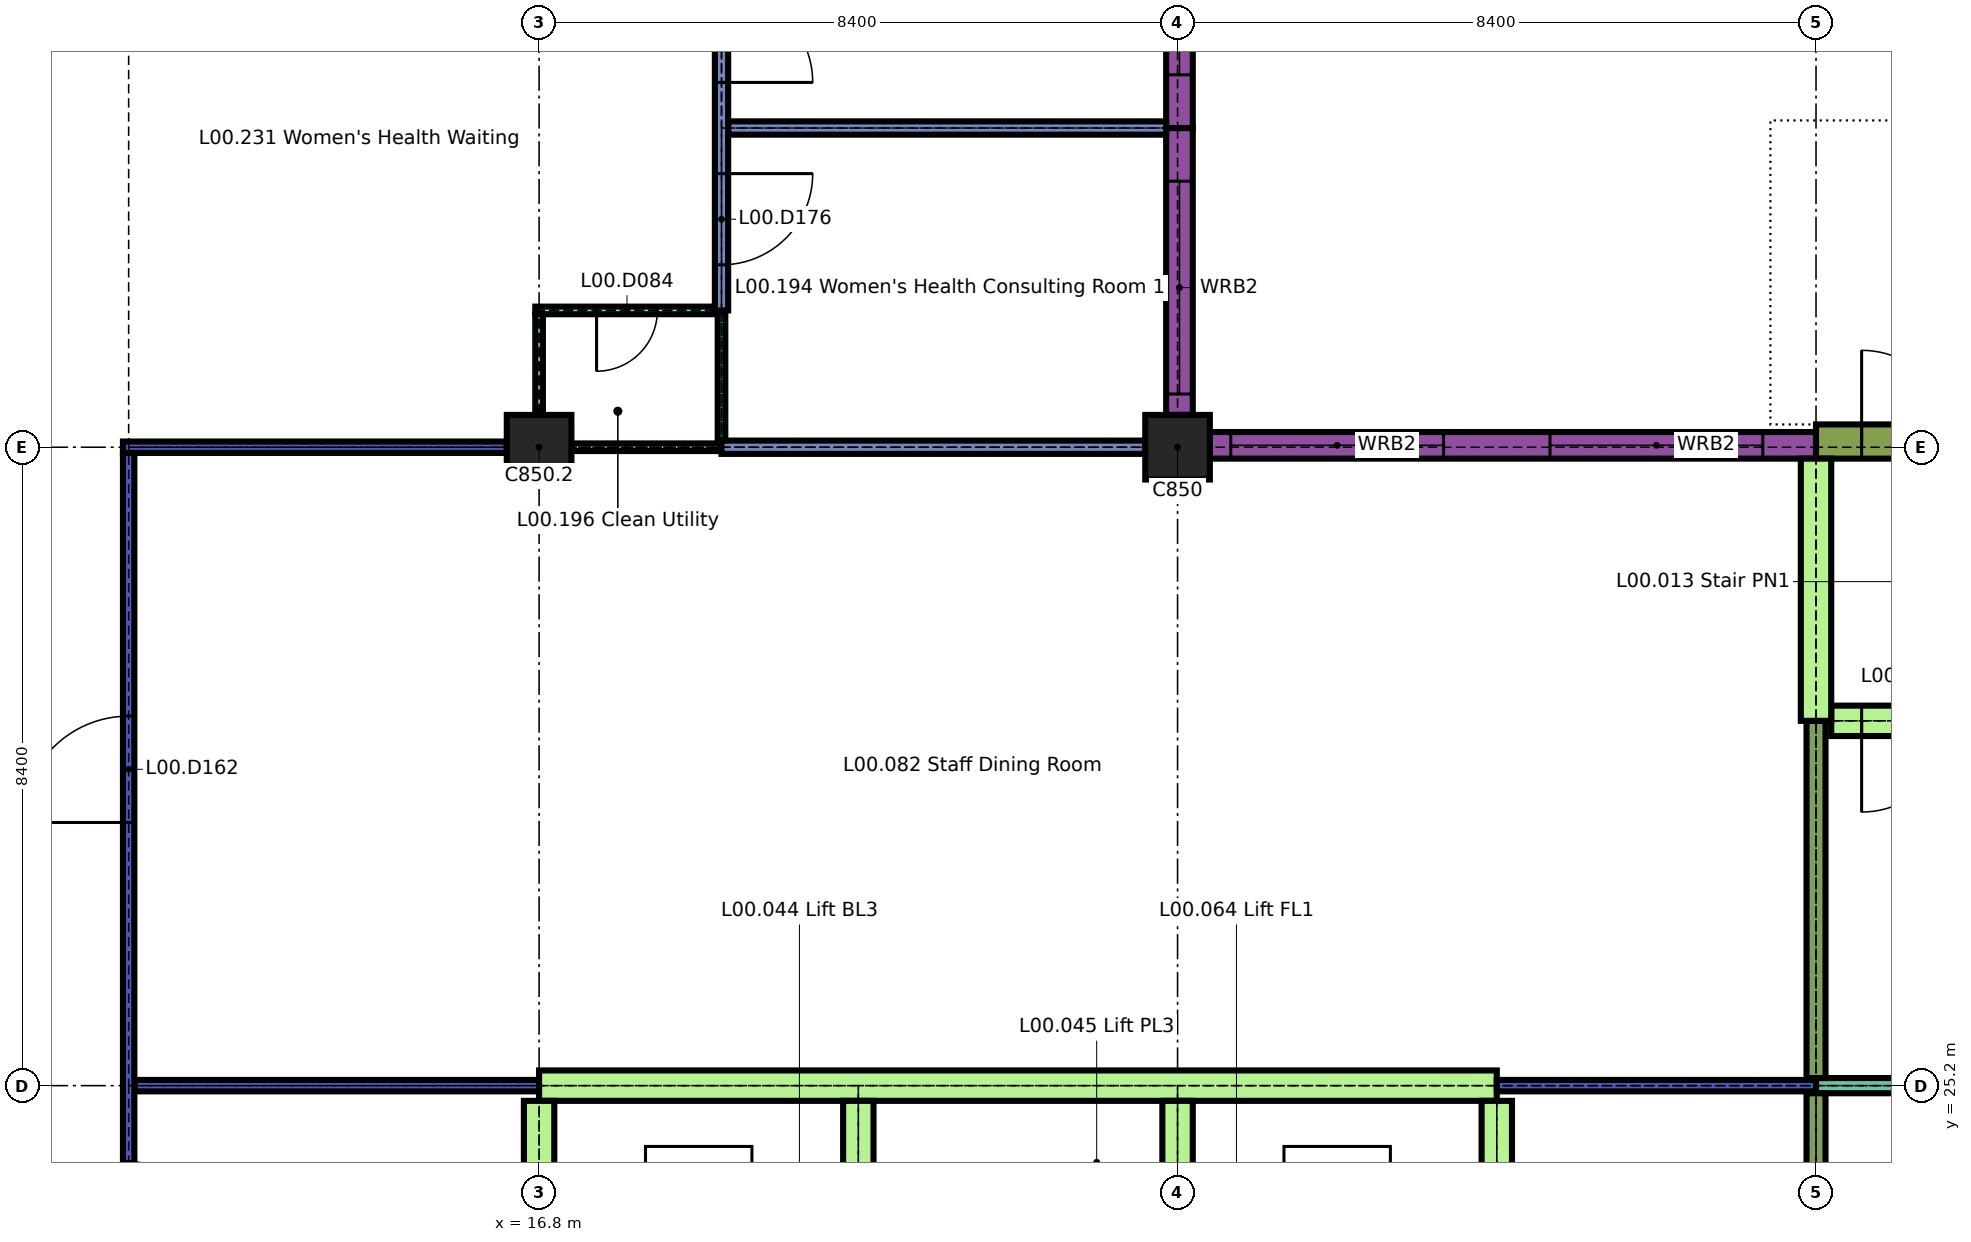
"""IFC4 building model, lengths in metres.
Left out: names, types, materials, properties, quantities, classifications, styles, units other than length and angle.
Written with IfcOpenShell. Run it as: python <this file> out.ifc"""

import sys

from ifc_helpers import new_model, si_unit, direction, frame, frame_2d, origin, origin_2d, place, context, subcontext, project, spatial, rectangle, extrude, element, fill, save


model = new_model("IFC4")
c1 = context("Model", 3, precision=1e-05, world=origin(), true_north=direction((0.0, 1.0)))
c2 = subcontext(c1, "Body", "Model", "MODEL_VIEW")
j1 = project(units=[si_unit("LENGTHUNIT", "METRE"), si_unit("PLANEANGLEUNIT", "RADIAN")], contexts=[c1])
p1 = place(None, origin())
s1 = spatial("IfcSite", under=j1, at=p1, CompositionType="ELEMENT")
p2 = place(p1, origin())
s2 = spatial("IfcBuilding", under=s1, at=p2, CompositionType="ELEMENT")
p3 = place(p2, origin())
s3 = spatial("IfcBuildingStorey", under=s2, at=p3, CompositionType="ELEMENT", Elevation=0.0)
for number, where, z_axis, x_axis in (
    (1, (16.8, 33.6, 0.0), (0.0, 0.0, 1.0), (1.0, 0.0, 0.0)),
    (2, (25.2, 33.6, 0.0), (0.0, 0.0, 1.0), (1.0, 0.0, 0.0)),
):
    element("IfcColumn", number, at=place(p3, frame(where, z_axis=z_axis, x_axis=x_axis)), inside=s3, PredefinedType="COLUMN", context=c2, shape_type="SweptSolid", body=[
        extrude(rectangle(XDim=0.85, YDim=0.85, at=origin_2d()), origin(), (0.0, 0.0, 1.0), 4.14),
    ])
p4 = place(p3, frame((25.625, 33.625, 0.0), z_axis=(0.0, 0.0, 1.0), x_axis=(1.0, 0.0, 0.0)))
e3 = element("IfcWall", 3, at=p4, inside=s3, PredefinedType="SOLIDWALL", context=c2, shape_type="SweptSolid", body=[
    extrude(rectangle(XDim=7.975, YDim=0.35, at=frame_2d((3.988, 0.0))), origin(), (0.0, 0.0, 1.0), 3.84),
])
p5 = place(p4, frame((0.275, 0.0, 1.0)))
e4 = element("IfcOpeningElement", 4, at=p5, cuts=e3, PredefinedType="OPENING", context=c2, shape_type="SweptSolid", body=[
    extrude(rectangle(XDim=2.8, YDim=1.5, at=frame_2d((1.4, 0.75))), frame((0.0, 0.185, 0.0), z_axis=(0.0, -1.0, 0.0), x_axis=(1.0, 0.0, 0.0)), (0.0, 0.0, 1.0), 0.37),
])
p6 = place(p4, frame((4.475, 0.0, 1.0)))
e5 = element("IfcOpeningElement", 5, at=p6, cuts=e3, PredefinedType="OPENING", context=c2, shape_type="SweptSolid", body=[
    extrude(rectangle(XDim=2.8, YDim=1.5, at=frame_2d((1.4, 0.75))), frame((0.0, 0.185, 0.0), z_axis=(0.0, -1.0, 0.0), x_axis=(1.0, 0.0, 0.0)), (0.0, 0.0, 1.0), 0.37),
])
p7 = place(p3, frame((33.6, 33.675, 0.0), z_axis=(0.0, 0.0, 1.0), x_axis=(1.0, 0.0, 0.0)))
e6 = element("IfcWall", 6, at=p7, inside=s3, PredefinedType="SOLIDWALL", context=c2, shape_type="SweptSolid", body=[
    extrude(rectangle(XDim=3.7, YDim=0.45, at=frame_2d((1.85, 0.0))), origin(), (0.0, 0.0, 1.0), 4.14),
])
p8 = place(p7, frame((0.6, 0.0, 0.0)))
e7 = element("IfcOpeningElement", 7, at=p8, cuts=e6, PredefinedType="OPENING", context=c2, shape_type="SweptSolid", body=[
    extrude(rectangle(XDim=1.2, YDim=2.1, at=frame_2d((0.6, 1.05))), frame((0.0, 0.235, 0.0), z_axis=(0.0, -1.0, 0.0), x_axis=(1.0, 0.0, 0.0)), (0.0, 0.0, 1.0), 0.47),
])
p9 = place(p3, frame((25.225, 34.025, 0.0), z_axis=(0.0, 0.0, 1.0), x_axis=(0.0, 1.0, 0.0)))
e8 = element("IfcWall", 8, at=p9, inside=s3, PredefinedType="SOLIDWALL", context=c2, shape_type="SweptSolid", body=[
    extrude(rectangle(XDim=3.775, YDim=0.35, at=frame_2d((1.888, 0.0))), origin(), (0.0, 0.0, 1.0), 3.84),
])
p10 = place(p9, frame((0.275, 0.0, 1.0)))
e9 = element("IfcOpeningElement", 9, at=p10, cuts=e8, PredefinedType="OPENING", context=c2, shape_type="SweptSolid", body=[
    extrude(rectangle(XDim=2.8, YDim=1.5, at=frame_2d((1.4, 0.75))), frame((0.0, 0.185, 0.0), z_axis=(0.0, -1.0, 0.0), x_axis=(1.0, 0.0, 0.0)), (0.0, 0.0, 1.0), 0.37),
])
p11 = place(p3, frame((25.225, 37.8, 0.0), z_axis=(0.0, 0.0, 1.0), x_axis=(0.0, 1.0, 0.0)))
e10 = element("IfcWall", 10, at=p11, inside=s3, PredefinedType="SOLIDWALL", context=c2, shape_type="SweptSolid", body=[
    extrude(rectangle(XDim=4.2, YDim=0.35, at=frame_2d((2.1, 0.0))), origin(), (0.0, 0.0, 1.0), 3.84),
])
p12 = place(p11, frame((0.7, 0.0, 1.0)))
e11 = element("IfcOpeningElement", 11, at=p12, cuts=e10, PredefinedType="OPENING", context=c2, shape_type="SweptSolid", body=[
    extrude(rectangle(XDim=2.8, YDim=1.5, at=frame_2d((1.4, 0.75))), frame((0.0, 0.185, 0.0), z_axis=(0.0, -1.0, 0.0), x_axis=(1.0, 0.0, 0.0)), (0.0, 0.0, 1.0), 0.37),
])
p13 = place(p3, frame((11.475, 25.2, 0.0), z_axis=(0.0, 0.0, 1.0), x_axis=(1.0, 0.0, 0.0)))
e12 = element("IfcWall", 12, at=p13, inside=s3, PredefinedType="PARTITIONING", context=c2, shape_type="SweptSolid", body=[
    extrude(rectangle(XDim=5.325, YDim=0.15, at=frame_2d((2.663, 0.0))), origin(), (0.0, 0.0, 1.0), 4.14),
])
p14 = place(p3, frame((16.8, 25.2, 0.0), z_axis=(0.0, 0.0, 1.0), x_axis=(1.0, 0.0, 0.0)))
e13 = element("IfcWall", 13, at=p14, inside=s3, PredefinedType="SHEAR", context=c2, shape_type="SweptSolid", body=[
    extrude(rectangle(XDim=12.6, YDim=0.4, at=frame_2d((6.3, 0.0))), origin(), (0.0, 0.0, 1.0), 4.14),
])
p15 = place(p3, frame((29.4, 25.2, 0.0), z_axis=(0.0, 0.0, 1.0), x_axis=(1.0, 0.0, 0.0)))
e14 = element("IfcWall", 14, at=p15, inside=s3, PredefinedType="PARTITIONING", context=c2, shape_type="SweptSolid", body=[
    extrude(rectangle(XDim=4.2, YDim=0.15, at=frame_2d((2.1, 0.0))), origin(), (0.0, 0.0, 1.0), 4.14),
])
p16 = place(p3, frame((33.6, 25.2, 0.0), z_axis=(0.0, 0.0, 1.0), x_axis=(1.0, 0.0, 0.0)))
e15 = element("IfcWall", 15, at=p16, inside=s3, PredefinedType="PARTITIONING", context=c2, shape_type="SweptSolid", body=[
    extrude(rectangle(XDim=8.4, YDim=0.2, at=frame_2d((4.2, 0.0))), origin(), (0.0, 0.0, 1.0), 4.14),
])
p17 = place(p16, frame((3.5, 0.0, 0.0)))
e16 = element("IfcOpeningElement", 16, at=p17, cuts=e15, PredefinedType="OPENING", context=c2, shape_type="SweptSolid", body=[
    extrude(rectangle(XDim=1.4, YDim=2.1, at=frame_2d((0.7, 1.05))), frame((0.0, 0.11, 0.0), z_axis=(0.0, -1.0, 0.0), x_axis=(1.0, 0.0, 0.0)), (0.0, 0.0, 1.0), 0.22),
])
p18 = place(p3, frame((33.8, 30.0, 0.0), z_axis=(0.0, 0.0, 1.0), x_axis=(1.0, 0.0, 0.0)))
e17 = element("IfcWall", 17, at=p18, inside=s3, PredefinedType="SHEAR", context=c2, shape_type="SweptSolid", body=[
    extrude(rectangle(XDim=8.0, YDim=0.4, at=frame_2d((4.0, 0.0))), origin(), (0.0, 0.0, 1.0), 4.14),
])
p19 = place(p18, frame((0.4, 0.0, 0.0)))
e18 = element("IfcOpeningElement", 18, at=p19, cuts=e17, PredefinedType="OPENING", context=c2, shape_type="SweptSolid", body=[
    extrude(rectangle(XDim=1.2, YDim=2.1, at=frame_2d((0.6, 1.05))), frame((0.0, 0.21, 0.0), z_axis=(0.0, -1.0, 0.0), x_axis=(1.0, 0.0, 0.0)), (0.0, 0.0, 1.0), 0.42),
])
p20 = place(p3, frame((11.325, 33.6, 0.0), z_axis=(0.0, 0.0, 1.0), x_axis=(1.0, 0.0, 0.0)))
e19 = element("IfcWall", 19, at=p20, inside=s3, PredefinedType="PARTITIONING", context=c2, shape_type="SweptSolid", body=[
    extrude(rectangle(XDim=5.05, YDim=0.15, at=frame_2d((2.525, 0.0))), origin(), (0.0, 0.0, 1.0), 4.14),
])
p21 = place(p3, frame((17.225, 33.6, 0.0), z_axis=(0.0, 0.0, 1.0), x_axis=(1.0, 0.0, 0.0)))
e20 = element("IfcWall", 20, at=p21, inside=s3, PredefinedType="PARTITIONING", context=c2, shape_type="SweptSolid", body=[
    extrude(rectangle(XDim=1.975, YDim=0.1, at=frame_2d((0.987, 0.0))), origin(), (0.0, 0.0, 1.0), 4.14),
])
p22 = place(p3, frame((19.2, 33.6, 0.0), z_axis=(0.0, 0.0, 1.0), x_axis=(1.0, 0.0, 0.0)))
e21 = element("IfcWall", 21, at=p22, inside=s3, PredefinedType="PARTITIONING", context=c2, shape_type="SweptSolid", body=[
    extrude(rectangle(XDim=5.575, YDim=0.175, at=frame_2d((2.788, 0.0))), origin(), (0.0, 0.0, 1.0), 4.14),
])
p23 = place(p3, frame((16.75, 35.4, 0.0), z_axis=(0.0, 0.0, 1.0), x_axis=(1.0, 0.0, 0.0)))
e22 = element("IfcWall", 22, at=p23, inside=s3, PredefinedType="PARTITIONING", context=c2, shape_type="SweptSolid", body=[
    extrude(rectangle(XDim=2.363, YDim=0.1, at=frame_2d((1.181, 0.0))), origin(), (0.0, 0.0, 1.0), 4.14),
])
p24 = place(p23, frame((0.806, 0.0, 0.0)))
e23 = element("IfcOpeningElement", 23, at=p24, cuts=e22, PredefinedType="OPENING", context=c2, shape_type="SweptSolid", body=[
    extrude(rectangle(XDim=0.8, YDim=2.1, at=frame_2d((0.4, 1.05))), frame((0.0, 0.06, 0.0), z_axis=(0.0, -1.0, 0.0), x_axis=(1.0, 0.0, 0.0)), (0.0, 0.0, 1.0), 0.12),
])
p25 = place(p3, frame((19.288, 37.8, 0.0), z_axis=(0.0, 0.0, 1.0), x_axis=(1.0, 0.0, 0.0)))
e24 = element("IfcWall", 24, at=p25, inside=s3, PredefinedType="PARTITIONING", context=c2, shape_type="SweptSolid", body=[
    extrude(rectangle(XDim=5.762, YDim=0.175, at=frame_2d((2.881, 0.0))), origin(), (0.0, 0.0, 1.0), 4.14),
])
p26 = place(p3, frame((11.4, 16.875, 0.0), z_axis=(0.0, 0.0, 1.0), x_axis=(0.0, 1.0, 0.0)))
e25 = element("IfcWall", 25, at=p26, inside=s3, PredefinedType="PARTITIONING", context=c2, shape_type="SweptSolid", body=[
    extrude(rectangle(XDim=16.65, YDim=0.15, at=frame_2d((8.325, 0.0))), origin(), (0.0, 0.0, 1.0), 4.14),
])
p27 = place(p26, frame((2.062, 0.0, 0.0)))
e26 = element("IfcOpeningElement", 26, at=p27, cuts=e25, PredefinedType="OPENING", context=c2, shape_type="SweptSolid", body=[
    extrude(rectangle(XDim=1.2, YDim=2.1, at=frame_2d((0.6, 1.05))), frame((0.0, 0.085, 0.0), z_axis=(0.0, -1.0, 0.0), x_axis=(1.0, 0.0, 0.0)), (0.0, 0.0, 1.0), 0.17),
])
p28 = place(p26, frame((6.325, 0.0, 0.0)))
e27 = element("IfcOpeningElement", 27, at=p28, cuts=e25, PredefinedType="OPENING", context=c2, shape_type="SweptSolid", body=[
    extrude(rectangle(XDim=1.0, YDim=2.1, at=frame_2d((0.5, 1.05))), frame((0.0, 0.085, 0.0), z_axis=(0.0, -1.0, 0.0), x_axis=(1.0, 0.0, 0.0)), (0.0, 0.0, 1.0), 0.17),
])
p29 = place(p26, frame((11.788, 0.0, 0.0)))
e28 = element("IfcOpeningElement", 28, at=p29, cuts=e25, PredefinedType="OPENING", context=c2, shape_type="SweptSolid", body=[
    extrude(rectangle(XDim=1.4, YDim=2.1, at=frame_2d((0.7, 1.05))), frame((0.0, 0.085, 0.0), z_axis=(0.0, -1.0, 0.0), x_axis=(1.0, 0.0, 0.0)), (0.0, 0.0, 1.0), 0.17),
])
p30 = place(p3, frame((16.8, 21.6, 0.0), z_axis=(0.0, 0.0, 1.0), x_axis=(0.0, 1.0, 0.0)))
e29 = element("IfcWall", 29, at=p30, inside=s3, PredefinedType="SHEAR", context=c2, shape_type="SweptSolid", body=[
    extrude(rectangle(XDim=3.4, YDim=0.4, at=frame_2d((1.7, 0.0))), origin(), (0.0, 0.0, 1.0), 4.14),
])
p31 = place(p3, frame((16.8, 34.025, 0.0), z_axis=(0.0, 0.0, 1.0), x_axis=(0.0, 1.0, 0.0)))
e30 = element("IfcWall", 30, at=p31, inside=s3, PredefinedType="PARTITIONING", context=c2, shape_type="SweptSolid", body=[
    extrude(rectangle(XDim=1.325, YDim=0.1, at=frame_2d((0.663, 0.0))), origin(), (0.0, 0.0, 1.0), 4.14),
])
p32 = place(p3, frame((19.2, 33.688, 0.0), z_axis=(0.0, 0.0, 1.0), x_axis=(0.0, 1.0, 0.0)))
e31 = element("IfcWall", 31, at=p32, inside=s3, PredefinedType="PARTITIONING", context=c2, shape_type="SweptSolid", body=[
    extrude(rectangle(XDim=1.712, YDim=0.1, at=frame_2d((0.856, 0.0))), origin(), (0.0, 0.0, 1.0), 4.14),
])
p33 = place(p3, frame((19.2, 35.4, 0.0), z_axis=(0.0, 0.0, 1.0), x_axis=(0.0, 1.0, 0.0)))
e32 = element("IfcWall", 32, at=p33, inside=s3, PredefinedType="PARTITIONING", context=c2, shape_type="SweptSolid", body=[
    extrude(rectangle(XDim=4.8, YDim=0.175, at=frame_2d((2.4, 0.0))), origin(), (0.0, 0.0, 1.0), 4.14),
])
p34 = place(p33, frame((0.6, 0.0, 0.0)))
e33 = element("IfcOpeningElement", 33, at=p34, cuts=e32, PredefinedType="OPENING", context=c2, shape_type="SweptSolid", body=[
    extrude(rectangle(XDim=1.2, YDim=2.1, at=frame_2d((0.6, 1.05))), frame((0.0, 0.097, 0.0), z_axis=(0.0, -1.0, 0.0), x_axis=(1.0, 0.0, 0.0)), (0.0, 0.0, 1.0), 0.195),
])
p35 = place(p33, frame((3.0, 0.0, 0.0)))
e34 = element("IfcOpeningElement", 34, at=p35, cuts=e32, PredefinedType="OPENING", context=c2, shape_type="SweptSolid", body=[
    extrude(rectangle(XDim=1.2, YDim=2.1, at=frame_2d((0.6, 1.05))), frame((0.0, 0.097, 0.0), z_axis=(0.0, -1.0, 0.0), x_axis=(1.0, 0.0, 0.0)), (0.0, 0.0, 1.0), 0.195),
])
for number, where, z_axis, x_axis in (
    (35, (21.0, 21.8, 0.0), (0.0, 0.0, 1.0), (0.0, 1.0, 0.0)),
    (36, (25.2, 21.8, 0.0), (0.0, 0.0, 1.0), (0.0, 1.0, 0.0)),
):
    element("IfcWall", number, at=place(p3, frame(where, z_axis=z_axis, x_axis=x_axis)), inside=s3, PredefinedType="SHEAR", context=c2, shape_type="SweptSolid", body=[
        extrude(rectangle(XDim=3.2, YDim=0.4, at=frame_2d((1.6, 0.0))), origin(), (0.0, 0.0, 1.0), 4.14),
    ])
p36 = place(p3, frame((29.4, 21.6, 0.0), z_axis=(0.0, 0.0, 1.0), x_axis=(0.0, 1.0, 0.0)))
e37 = element("IfcWall", 37, at=p36, inside=s3, PredefinedType="SHEAR", context=c2, shape_type="SweptSolid", body=[
    extrude(rectangle(XDim=3.4, YDim=0.4, at=frame_2d((1.7, 0.0))), origin(), (0.0, 0.0, 1.0), 4.14),
])
p37 = place(p3, frame((33.6, 17.225, 0.0), z_axis=(0.0, 0.0, 1.0), x_axis=(0.0, 1.0, 0.0)))
e38 = element("IfcWall", 38, at=p37, inside=s3, PredefinedType="SOLIDWALL", context=c2, shape_type="SweptSolid", body=[
    extrude(rectangle(XDim=7.875, YDim=0.25, at=frame_2d((3.938, 0.0))), origin(), (0.0, 0.0, 1.0), 4.14),
])
p38 = place(p3, frame((33.6, 25.3, 0.0), z_axis=(0.0, 0.0, 1.0), x_axis=(0.0, 1.0, 0.0)))
e39 = element("IfcWall", 39, at=p38, inside=s3, PredefinedType="SOLIDWALL", context=c2, shape_type="SweptSolid", body=[
    extrude(rectangle(XDim=4.7, YDim=0.25, at=frame_2d((2.35, 0.0))), origin(), (0.0, 0.0, 1.0), 4.14),
])
p39 = place(p3, frame((33.6, 30.0, 0.0), z_axis=(0.0, 0.0, 1.0), x_axis=(0.0, 1.0, 0.0)))
e40 = element("IfcWall", 40, at=p39, inside=s3, PredefinedType="SHEAR", context=c2, shape_type="SweptSolid", body=[
    extrude(rectangle(XDim=3.45, YDim=0.4, at=frame_2d((1.725, 0.0))), origin(), (0.0, 0.0, 1.0), 4.14),
])
p40 = place(p5, origin())
e41 = element("IfcWindow", 41, at=p40, inside=s3, PartitioningType="DOUBLE_PANEL_VERTICAL", PredefinedType="WINDOW", context=c2, shape_type="SweptSolid", body=[
    extrude(rectangle(XDim=2.8, YDim=1.5, at=frame_2d((1.4, 0.75))), frame((0.0, 0.03, 0.0), z_axis=(0.0, -1.0, 0.0), x_axis=(1.0, 0.0, 0.0)), (0.0, 0.0, 1.0), 0.06),
])
fill(e4, e41)
p41 = place(p6, origin())
e42 = element("IfcWindow", 42, at=p41, inside=s3, PartitioningType="DOUBLE_PANEL_VERTICAL", PredefinedType="WINDOW", context=c2, shape_type="SweptSolid", body=[
    extrude(rectangle(XDim=2.8, YDim=1.5, at=frame_2d((1.4, 0.75))), frame((0.0, 0.03, 0.0), z_axis=(0.0, -1.0, 0.0), x_axis=(1.0, 0.0, 0.0)), (0.0, 0.0, 1.0), 0.06),
])
fill(e5, e42)
p42 = place(p8, origin())
e43 = element("IfcDoor", 43, at=p42, inside=s3, OperationType="SINGLE_SWING_RIGHT", PredefinedType="DOOR", context=c2, shape_type="SweptSolid", body=[
    extrude(rectangle(XDim=1.2, YDim=2.1, at=frame_2d((0.6, 1.05))), frame((0.0, 0.025, 0.0), z_axis=(0.0, -1.0, 0.0), x_axis=(1.0, 0.0, 0.0)), (0.0, 0.0, 1.0), 0.05),
])
fill(e7, e43)
p43 = place(p10, origin())
e44 = element("IfcWindow", 44, at=p43, inside=s3, PartitioningType="DOUBLE_PANEL_VERTICAL", PredefinedType="WINDOW", context=c2, shape_type="SweptSolid", body=[
    extrude(rectangle(XDim=2.8, YDim=1.5, at=frame_2d((1.4, 0.75))), frame((0.0, 0.03, 0.0), z_axis=(0.0, -1.0, 0.0), x_axis=(1.0, 0.0, 0.0)), (0.0, 0.0, 1.0), 0.06),
])
fill(e9, e44)
p44 = place(p12, origin())
e45 = element("IfcWindow", 45, at=p44, inside=s3, PartitioningType="DOUBLE_PANEL_VERTICAL", PredefinedType="WINDOW", context=c2, shape_type="SweptSolid", body=[
    extrude(rectangle(XDim=2.8, YDim=1.5, at=frame_2d((1.4, 0.75))), frame((0.0, 0.03, 0.0), z_axis=(0.0, -1.0, 0.0), x_axis=(1.0, 0.0, 0.0)), (0.0, 0.0, 1.0), 0.06),
])
fill(e11, e45)
p45 = place(p19, origin())
e46 = element("IfcDoor", 46, at=p45, inside=s3, OperationType="SINGLE_SWING_LEFT", PredefinedType="DOOR", context=c2, shape_type="SweptSolid", body=[
    extrude(rectangle(XDim=1.2, YDim=2.1, at=frame_2d((0.6, 1.05))), frame((0.0, 0.025, 0.0), z_axis=(0.0, -1.0, 0.0), x_axis=(1.0, 0.0, 0.0)), (0.0, 0.0, 1.0), 0.05),
])
fill(e18, e46)
p46 = place(p24, origin())
e47 = element("IfcDoor", 47, at=p46, inside=s3, OperationType="SINGLE_SWING_LEFT", PredefinedType="DOOR", context=c2, shape_type="SweptSolid", body=[
    extrude(rectangle(XDim=0.8, YDim=2.1, at=frame_2d((0.4, 1.05))), frame((0.0, 0.02, 0.0), z_axis=(0.0, -1.0, 0.0), x_axis=(1.0, 0.0, 0.0)), (0.0, 0.0, 1.0), 0.04),
])
fill(e23, e47)
p47 = place(p29, origin())
e48 = element("IfcDoor", 48, at=p47, inside=s3, OperationType="SINGLE_SWING_RIGHT", PredefinedType="DOOR", context=c2, shape_type="SweptSolid", body=[
    extrude(rectangle(XDim=1.4, YDim=2.1, at=frame_2d((0.7, 1.05))), frame((0.0, 0.025, 0.0), z_axis=(0.0, -1.0, 0.0), x_axis=(1.0, 0.0, 0.0)), (0.0, 0.0, 1.0), 0.05),
])
fill(e28, e48)
p48 = place(p34, origin())
e49 = element("IfcDoor", 49, at=p48, inside=s3, OperationType="SINGLE_SWING_RIGHT", PredefinedType="DOOR", context=c2, shape_type="SweptSolid", body=[
    extrude(rectangle(XDim=1.2, YDim=2.1, at=frame_2d((0.6, 1.05))), frame((0.0, 0.035, 0.0), z_axis=(0.0, -1.0, 0.0), x_axis=(1.0, 0.0, 0.0)), (0.0, 0.0, 1.0), 0.07),
])
fill(e33, e49)
p49 = place(p35, origin())
e50 = element("IfcDoor", 50, at=p49, inside=s3, OperationType="SINGLE_SWING_LEFT", PredefinedType="DOOR", context=c2, shape_type="SweptSolid", body=[
    extrude(rectangle(XDim=1.2, YDim=2.1, at=frame_2d((0.6, 1.05))), frame((0.0, 0.035, 0.0), z_axis=(0.0, -1.0, 0.0), x_axis=(1.0, 0.0, 0.0)), (0.0, 0.0, 1.0), 0.07),
])
fill(e34, e50)
save(model, sys.argv[1])
